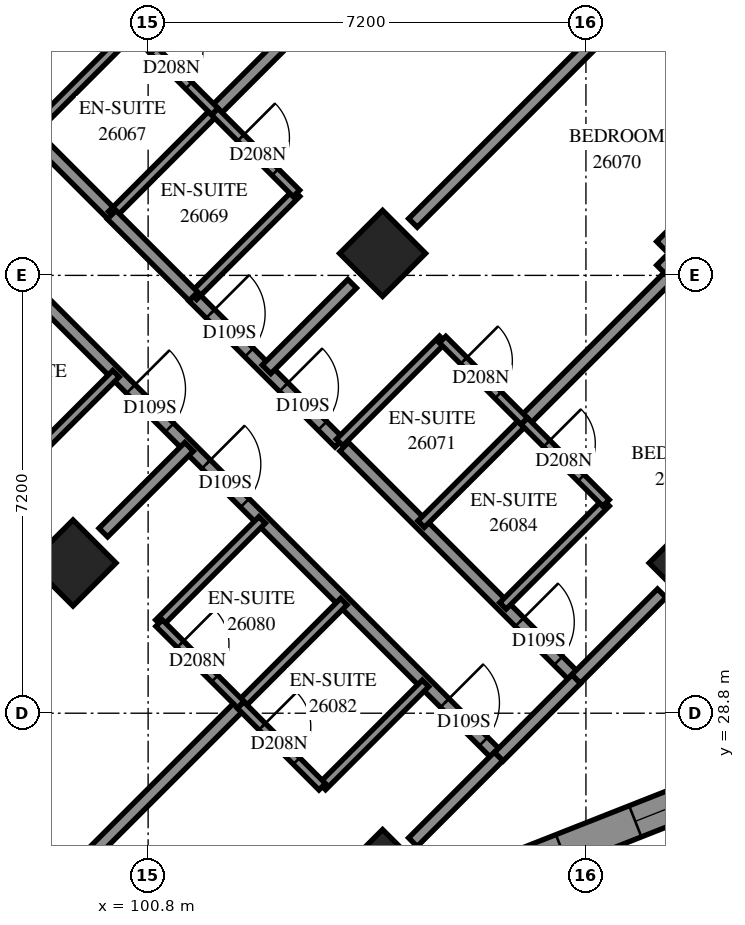
"""IFC4 building model, lengths in metres.
Left out: names, types, materials, properties, quantities, classifications, styles, units other than length and angle.
Written with IfcOpenShell. Run it as: python <this file> out.ifc"""

import sys

from ifc_helpers import new_model, si_unit, direction, frame, frame_2d, origin, origin_2d, place, context, subcontext, project, spatial, polyline, rectangle, outline, extrude, element, fill, save


model = new_model("IFC4")
c1 = context("Model", 3, precision=1e-05, world=origin(), true_north=direction((0.0, 1.0)))
c2 = subcontext(c1, "Body", "Model", "MODEL_VIEW")
j1 = project(units=[si_unit("LENGTHUNIT", "METRE"), si_unit("PLANEANGLEUNIT", "RADIAN")], contexts=[c1])
p1 = place(None, origin())
s1 = spatial("IfcSite", under=j1, at=p1, CompositionType="ELEMENT")
p2 = place(p1, origin())
s2 = spatial("IfcBuilding", under=s1, at=p2, CompositionType="ELEMENT")
p3 = place(p2, frame((0.0, 0.0, 98.2)))
s3 = spatial("IfcBuildingStorey", under=s2, at=p3, CompositionType="ELEMENT", Elevation=98.2)
for number, where, z_axis, x_axis in (
    (1, (104.656, 36.362, 0.0), (0.0, 0.0, 1.0), (0.707, -0.707, 0.0)),
    (2, (99.565, 31.271, 0.0), (0.0, 0.0, 1.0), (0.707, -0.707, 0.0)),
    (3, (109.747, 31.271, 0.0), (0.0, 0.0, 1.0), (0.707, -0.707, 0.0)),
    (4, (104.656, 26.18, 0.0), (0.0, 0.0, 1.0), (0.707, -0.707, 0.0)),
):
    element("IfcColumn", number, at=place(p3, frame(where, z_axis=z_axis, x_axis=x_axis)), inside=s3, PredefinedType="COLUMN", context=c2, shape_type="SweptSolid", body=[
        extrude(rectangle(XDim=1.0, YDim=1.0, at=origin_2d()), origin(), (0.0, 0.0, 1.0), 3.1),
    ])
p4 = place(p3, frame((105.911, 25.878, 0.0), z_axis=(0.0, 0.0, 1.0), x_axis=(0.930334543, 0.3667119279, 0.0)))
e5 = element("IfcWall", 5, at=p4, inside=s3, PredefinedType="SOLIDWALL", context=c2, shape_type="SweptSolid", body=[
    extrude(outline(polyline([(0.119, -0.275), (5.64, -0.275), (5.39, 0.275), (-0.119, 0.275), (0.119, -0.275)])), origin(), (0.0, 0.0, 1.0), 3.1),
])
p5 = place(p4, frame((0.623, 0.0, 0.5)))
e6 = element("IfcOpeningElement", 6, at=p5, cuts=e5, PredefinedType="OPENING", context=c2, shape_type="SweptSolid", body=[
    extrude(rectangle(XDim=1.2, YDim=2.45, at=frame_2d((0.6, 1.225))), frame((0.0, 0.285, 0.0), z_axis=(0.0, -1.0, 0.0), x_axis=(1.0, 0.0, 0.0)), (0.0, 0.0, 1.0), 0.57),
])
p6 = place(p4, frame((3.118, 0.0, 0.5)))
e7 = element("IfcOpeningElement", 7, at=p6, cuts=e5, PredefinedType="OPENING", context=c2, shape_type="SweptSolid", body=[
    extrude(rectangle(XDim=1.2, YDim=2.45, at=frame_2d((0.6, 1.225))), frame((0.0, 0.285, 0.0), z_axis=(0.0, -1.0, 0.0), x_axis=(1.0, 0.0, 0.0)), (0.0, 0.0, 1.0), 0.57),
])
p7 = place(p3, frame((112.824, 32.896, 0.0), z_axis=(0.0, 0.0, 1.0), x_axis=(-0.7071067812, 0.7071067812, 0.0)))
e8 = element("IfcWall", 8, at=p7, inside=s3, PredefinedType="SOLIDWALL", context=c2, shape_type="SweptSolid", body=[
    extrude(outline(polyline([(-0.174, -0.275), (4.626, -0.275), (5.176, 0.275), (0.174, 0.275), (-0.174, -0.275)])), origin(), (0.0, 0.0, 1.0), 3.1),
])
p8 = place(p7, frame((1.964, 0.0, 0.6)))
e9 = element("IfcOpeningElement", 9, at=p8, cuts=e8, PredefinedType="OPENING", context=c2, shape_type="SweptSolid", body=[
    extrude(rectangle(XDim=1.8, YDim=1.9, at=frame_2d((0.9, 0.95))), frame((0.0, 0.285, 0.0), z_axis=(0.0, -1.0, 0.0), x_axis=(1.0, 0.0, 0.0)), (0.0, 0.0, 1.0), 0.57),
])
p9 = place(p3, frame((109.358, 36.362, 0.0), z_axis=(0.0, 0.0, 1.0), x_axis=(0.7071067812, 0.7071067812, 0.0)))
e10 = element("IfcWall", 10, at=p9, inside=s3, PredefinedType="SOLIDWALL", context=c2, shape_type="SweptSolid", body=[
    extrude(outline(polyline([(0.275, -0.275), (6.126, -0.275), (5.381, 0.275), (-0.275, 0.275), (0.275, -0.275)])), origin(), (0.0, 0.0, 1.0), 3.1),
])
p10 = place(p9, frame((1.137, 0.0, 0.6)))
e11 = element("IfcOpeningElement", 11, at=p10, cuts=e10, PredefinedType="OPENING", context=c2, shape_type="SweptSolid", body=[
    extrude(rectangle(XDim=1.8, YDim=1.9, at=frame_2d((0.9, 0.95))), frame((0.0, 0.285, 0.0), z_axis=(0.0, -1.0, 0.0), x_axis=(1.0, 0.0, 0.0)), (0.0, 0.0, 1.0), 0.57),
])
p11 = place(p3, frame((93.339, 41.309, 0.0), z_axis=(0.0, 0.0, 1.0), x_axis=(0.7071067812, -0.7071067812, 0.0)))
e12 = element("IfcWall", 12, at=p11, inside=s3, PredefinedType="PARTITIONING", context=c2, shape_type="SweptSolid", body=[
    extrude(rectangle(XDim=18.702, YDim=0.2, at=frame_2d((9.351, 0.0))), origin(), (0.0, 0.0, 1.0), 3.1),
])
p12 = place(p11, frame((3.05, 0.0, 0.0)))
e13 = element("IfcOpeningElement", 13, at=p12, cuts=e12, PredefinedType="OPENING", context=c2, shape_type="SweptSolid", body=[
    extrude(rectangle(XDim=0.9, YDim=2.1, at=frame_2d((0.45, 1.05))), frame((0.0, 0.11, 0.0), z_axis=(0.0, -1.0, 0.0), x_axis=(1.0, 0.0, 0.0)), (0.0, 0.0, 1.0), 0.22),
])
p13 = place(p11, frame((4.7, 0.0, 0.0)))
e14 = element("IfcOpeningElement", 14, at=p13, cuts=e12, PredefinedType="OPENING", context=c2, shape_type="SweptSolid", body=[
    extrude(rectangle(XDim=0.9, YDim=2.1, at=frame_2d((0.45, 1.05))), frame((0.0, 0.11, 0.0), z_axis=(0.0, -1.0, 0.0), x_axis=(1.0, 0.0, 0.0)), (0.0, 0.0, 1.0), 0.22),
])
p14 = place(p11, frame((10.149, 0.0, 0.0)))
e15 = element("IfcOpeningElement", 15, at=p14, cuts=e12, PredefinedType="OPENING", context=c2, shape_type="SweptSolid", body=[
    extrude(rectangle(XDim=0.9, YDim=2.1, at=frame_2d((0.45, 1.05))), frame((0.0, 0.11, 0.0), z_axis=(0.0, -1.0, 0.0), x_axis=(1.0, 0.0, 0.0)), (0.0, 0.0, 1.0), 0.22),
])
p15 = place(p11, frame((11.9, 0.0, 0.0)))
e16 = element("IfcOpeningElement", 16, at=p15, cuts=e12, PredefinedType="OPENING", context=c2, shape_type="SweptSolid", body=[
    extrude(rectangle(XDim=0.9, YDim=2.1, at=frame_2d((0.45, 1.05))), frame((0.0, 0.11, 0.0), z_axis=(0.0, -1.0, 0.0), x_axis=(1.0, 0.0, 0.0)), (0.0, 0.0, 1.0), 0.22),
])
p16 = place(p11, frame((17.45, 0.0, 0.0)))
e17 = element("IfcOpeningElement", 17, at=p16, cuts=e12, PredefinedType="OPENING", context=c2, shape_type="SweptSolid", body=[
    extrude(rectangle(XDim=0.9, YDim=2.1, at=frame_2d((0.45, 1.05))), frame((0.0, 0.11, 0.0), z_axis=(0.0, -1.0, 0.0), x_axis=(1.0, 0.0, 0.0)), (0.0, 0.0, 1.0), 0.22),
])
p17 = place(p3, frame((101.896, 38.698, 0.0), z_axis=(0.0, 0.0, 1.0), x_axis=(0.7072296489, 0.7069838921, 0.0)))
e18 = element("IfcWall", 18, at=p17, inside=s3, PredefinedType="PARTITIONING", context=c2, shape_type="SweptSolid", body=[
    extrude(rectangle(XDim=8.545, YDim=0.2, at=frame_2d((4.272, 0.0))), origin(), (0.0, 0.0, 1.0), 3.1),
])
p18 = place(p3, frame((96.492, 23.108, 0.0), z_axis=(0.0, 0.0, 1.0), x_axis=(0.7071128444, 0.7071007179, 0.0)))
e19 = element("IfcWall", 19, at=p18, inside=s3, PredefinedType="PARTITIONING", context=c2, shape_type="SweptSolid", body=[
    extrude(rectangle(XDim=8.246, YDim=0.2, at=frame_2d((4.123, 0.0))), origin(), (0.0, 0.0, 1.0), 3.1),
])
p19 = place(p3, frame((94.62, 42.587, 0.0), z_axis=(0.0, 0.0, 1.0), x_axis=(0.7071067812, -0.7071067812, 0.0)))
e20 = element("IfcWall", 20, at=p19, inside=s3, PredefinedType="PARTITIONING", context=c2, shape_type="SweptSolid", body=[
    extrude(rectangle(XDim=7.9, YDim=0.2, at=frame_2d((3.95, 0.0))), origin(), (0.0, 0.0, 1.0), 3.1),
])
p20 = place(p19, frame((2.998, 0.0, 0.0)))
e21 = element("IfcOpeningElement", 21, at=p20, cuts=e20, PredefinedType="OPENING", context=c2, shape_type="SweptSolid", body=[
    extrude(rectangle(XDim=0.9, YDim=2.1, at=frame_2d((0.45, 1.05))), frame((0.0, 0.11, 0.0), z_axis=(0.0, -1.0, 0.0), x_axis=(1.0, 0.0, 0.0)), (0.0, 0.0, 1.0), 0.22),
])
p21 = place(p19, frame((4.649, 0.0, 0.0)))
e22 = element("IfcOpeningElement", 22, at=p21, cuts=e20, PredefinedType="OPENING", context=c2, shape_type="SweptSolid", body=[
    extrude(rectangle(XDim=0.9, YDim=2.1, at=frame_2d((0.45, 1.05))), frame((0.0, 0.11, 0.0), z_axis=(0.0, -1.0, 0.0), x_axis=(1.0, 0.0, 0.0)), (0.0, 0.0, 1.0), 0.22),
])
p22 = place(p3, frame((105.155, 36.863, 0.0), z_axis=(0.0, 0.0, 1.0), x_axis=(0.7071067812, 0.7071067812, 0.0)))
e23 = element("IfcWall", 23, at=p22, inside=s3, PredefinedType="PARTITIONING", context=c2, shape_type="SweptSolid", body=[
    extrude(rectangle(XDim=5.787, YDim=0.2, at=frame_2d((2.893, 0.0))), origin(), (0.0, 0.0, 1.0), 3.1),
])
p23 = place(p3, frame((104.023, 33.184, 0.0), z_axis=(0.0, 0.0, 1.0), x_axis=(0.7071067812, -0.7071067812, 0.0)))
e24 = element("IfcWall", 24, at=p23, inside=s3, PredefinedType="PARTITIONING", context=c2, shape_type="SweptSolid", body=[
    extrude(rectangle(XDim=5.399, YDim=0.2, at=frame_2d((2.7, 0.0))), origin(), (0.0, 0.0, 1.0), 3.1),
])
p24 = place(p23, frame((4.08, 0.0, 0.0)))
e25 = element("IfcOpeningElement", 25, at=p24, cuts=e24, PredefinedType="OPENING", context=c2, shape_type="SweptSolid", body=[
    extrude(rectangle(XDim=0.9, YDim=2.1, at=frame_2d((0.45, 1.05))), frame((0.0, 0.11, 0.0), z_axis=(0.0, -1.0, 0.0), x_axis=(1.0, 0.0, 0.0)), (0.0, 0.0, 1.0), 0.22),
])
p25 = place(p3, frame((101.541, 35.651, 0.0), z_axis=(0.0, 0.0, 1.0), x_axis=(0.7071067812, -0.7071067812, 0.0)))
e26 = element("IfcWall", 26, at=p25, inside=s3, PredefinedType="PARTITIONING", context=c2, shape_type="SweptSolid", body=[
    extrude(rectangle(XDim=3.4, YDim=0.2, at=frame_2d((1.7, 0.0))), origin(), (0.0, 0.0, 1.0), 3.1),
])
p26 = place(p25, frame((0.4, 0.0, 0.0)))
e27 = element("IfcOpeningElement", 27, at=p26, cuts=e26, PredefinedType="OPENING", context=c2, shape_type="SweptSolid", body=[
    extrude(rectangle(XDim=0.9, YDim=2.1, at=frame_2d((0.45, 1.05))), frame((0.0, 0.11, 0.0), z_axis=(0.0, -1.0, 0.0), x_axis=(1.0, 0.0, 0.0)), (0.0, 0.0, 1.0), 0.22),
])
p27 = place(p25, frame((2.105, 0.0, 0.0)))
e28 = element("IfcOpeningElement", 28, at=p27, cuts=e26, PredefinedType="OPENING", context=c2, shape_type="SweptSolid", body=[
    extrude(rectangle(XDim=0.9, YDim=2.1, at=frame_2d((0.45, 1.05))), frame((0.0, 0.11, 0.0), z_axis=(0.0, -1.0, 0.0), x_axis=(1.0, 0.0, 0.0)), (0.0, 0.0, 1.0), 0.22),
])
p28 = place(p3, frame((106.989, 33.605, 0.0), z_axis=(0.0, 0.0, 1.0), x_axis=(0.7071067812, 0.7071067812, 0.0)))
e29 = element("IfcWall", 29, at=p28, inside=s3, PredefinedType="PARTITIONING", context=c2, shape_type="SweptSolid", body=[
    extrude(rectangle(XDim=3.35, YDim=0.2, at=frame_2d((1.675, 0.0))), origin(), (0.0, 0.0, 1.0), 3.1),
])
for number, where, z_axis, x_axis in (
    (30, (100.977, 30.281, 0.0), (0.0, 0.0, 1.0), (0.707, 0.707, 0.0)),
    (31, (98.573, 32.685, 0.0), (0.0, 0.0, 1.0), (0.707, 0.707, 0.0)),
):
    element("IfcWall", number, at=place(p3, frame(where, z_axis=z_axis, x_axis=x_axis)), inside=s3, PredefinedType="PARTITIONING", context=c2, shape_type="SweptSolid", body=[
        extrude(rectangle(XDim=2.401, YDim=0.15, at=frame_2d((1.201, 0.0))), origin(), (0.0, 0.0, 1.0), 3.1),
    ])
for number, where, z_axis, x_axis in (
    (32, (100.203, 36.997, 0.0), (0.0, 0.0, 1.0), (0.707, 0.708, 0.0)),
    (33, (105.29, 31.91, 0.0), (0.0, 0.0, 1.0), (0.708, 0.707, 0.0)),
):
    element("IfcWall", number, at=place(p3, frame(where, z_axis=z_axis, x_axis=x_axis)), inside=s3, PredefinedType="PARTITIONING", context=c2, shape_type="SweptSolid", body=[
        extrude(rectangle(XDim=2.4, YDim=0.15, at=frame_2d((1.2, 0.0))), origin(), (0.0, 0.0, 1.0), 3.1),
    ])
for number, where, z_axis, x_axis in (
    (34, (98.857, 38.343, 0.0), (0.0, 0.0, 1.0), (0.707, 0.707, 0.0)),
    (35, (101.545, 35.657, 0.0), (0.0, 0.0, 1.0), (0.707, 0.707, 0.0)),
    (36, (102.323, 28.939, 0.0), (0.0, 0.0, 1.0), (0.707, 0.707, 0.0)),
    (37, (103.665, 27.595, 0.0), (0.0, 0.0, 1.0), (0.707, 0.707, 0.0)),
    (38, (106.635, 30.565, 0.0), (0.0, 0.0, 1.0), (0.707, 0.707, 0.0)),
    (39, (103.949, 33.253, 0.0), (0.0, 0.0, 1.0), (0.707, 0.707, 0.0)),
):
    element("IfcWall", number, at=place(p3, frame(where, z_axis=z_axis, x_axis=x_axis)), inside=s3, PredefinedType="PARTITIONING", context=c2, shape_type="SweptSolid", body=[
        extrude(rectangle(XDim=2.398, YDim=0.15, at=frame_2d((1.199, 0.0))), origin(), (0.0, 0.0, 1.0), 3.1),
    ])
p29 = place(p3, frame((100.063, 31.771, 0.0), z_axis=(0.0, 0.0, 1.0), x_axis=(0.7071067812, 0.7071067812, 0.0)))
e40 = element("IfcWall", 40, at=p29, inside=s3, PredefinedType="PARTITIONING", context=c2, shape_type="SweptSolid", body=[
    extrude(rectangle(XDim=1.994, YDim=0.2, at=frame_2d((0.997, 0.0))), origin(), (0.0, 0.0, 1.0), 3.1),
])
for number, where, z_axis, x_axis in (
    (41, (107.837, 29.363, 0.0), (0.0, 0.0, 1.0), (0.707, 0.707, 0.0)),
    (42, (105.154, 26.68, 0.0), (0.0, 0.0, 1.0), (0.707, 0.707, 0.0)),
):
    element("IfcWall", number, at=place(p3, frame(where, z_axis=z_axis, x_axis=x_axis)), inside=s3, PredefinedType="PARTITIONING", context=c2, shape_type="SweptSolid", body=[
        extrude(rectangle(XDim=1.994, YDim=0.2, at=frame_2d((0.997, 0.0))), origin(), (0.0, 0.0, 1.0), 2.6),
    ])
p30 = place(p3, frame((102.747, 34.455, 0.0), z_axis=(0.0, 0.0, 1.0), x_axis=(0.7071067812, 0.7071067812, 0.0)))
e43 = element("IfcWall", 43, at=p30, inside=s3, PredefinedType="PARTITIONING", context=c2, shape_type="SweptSolid", body=[
    extrude(rectangle(XDim=1.991, YDim=0.2, at=frame_2d((0.996, 0.0))), origin(), (0.0, 0.0, 1.0), 3.1),
])
p31 = place(p3, frame((101.894, 38.693, 0.0), z_axis=(0.0, 0.0, 1.0), x_axis=(0.7071067812, -0.7071067812, 0.0)))
e44 = element("IfcWall", 44, at=p31, inside=s3, PredefinedType="PARTITIONING", context=c2, shape_type="SweptSolid", body=[
    extrude(rectangle(XDim=1.901, YDim=0.15, at=frame_2d((0.95, 0.0))), origin(), (0.0, 0.0, 1.0), 3.1),
])
p32 = place(p31, frame((0.608, 0.0, 0.0)))
e45 = element("IfcOpeningElement", 45, at=p32, cuts=e44, PredefinedType="OPENING", context=c2, shape_type="SweptSolid", body=[
    extrude(rectangle(XDim=0.8, YDim=2.1, at=frame_2d((0.4, 1.05))), frame((0.0, 0.085, 0.0), z_axis=(0.0, -1.0, 0.0), x_axis=(1.0, 0.0, 0.0)), (0.0, 0.0, 1.0), 0.17),
])
p33 = place(p3, frame((105.642, 34.944, 0.0), z_axis=(0.0, 0.0, 1.0), x_axis=(0.7071067812, -0.7071067812, 0.0)))
e46 = element("IfcWall", 46, at=p33, inside=s3, PredefinedType="PARTITIONING", context=c2, shape_type="SweptSolid", body=[
    extrude(rectangle(XDim=1.901, YDim=0.15, at=frame_2d((0.95, 0.0))), origin(), (0.0, 0.0, 1.0), 3.1),
])
p34 = place(p33, frame((0.491, 0.0, 0.0)))
e47 = element("IfcOpeningElement", 47, at=p34, cuts=e46, PredefinedType="OPENING", context=c2, shape_type="SweptSolid", body=[
    extrude(rectangle(XDim=0.8, YDim=2.1, at=frame_2d((0.4, 1.05))), frame((0.0, 0.085, 0.0), z_axis=(0.0, -1.0, 0.0), x_axis=(1.0, 0.0, 0.0)), (0.0, 0.0, 1.0), 0.17),
])
p35 = place(p3, frame((100.981, 30.283, 0.0), z_axis=(0.0, 0.0, 1.0), x_axis=(0.7076330979, -0.7065800724, 0.0)))
e48 = element("IfcWall", 48, at=p35, inside=s3, PredefinedType="PARTITIONING", context=c2, shape_type="SweptSolid", body=[
    extrude(rectangle(XDim=1.899, YDim=0.15, at=frame_2d((0.95, 0.0))), origin(), (0.0, 0.0, 1.0), 3.1),
])
p36 = place(p35, frame((0.493, 0.0, 0.0)))
e49 = element("IfcOpeningElement", 49, at=p36, cuts=e48, PredefinedType="OPENING", context=c2, shape_type="SweptSolid", body=[
    extrude(rectangle(XDim=0.8, YDim=2.1, at=frame_2d((0.4, 1.05))), frame((0.0, 0.085, 0.0), z_axis=(0.0, -1.0, 0.0), x_axis=(1.0, 0.0, 0.0)), (0.0, 0.0, 1.0), 0.17),
])
p37 = place(p3, frame((100.553, 40.037, 0.0), z_axis=(0.0, 0.0, 1.0), x_axis=(0.7076330979, -0.7065800724, 0.0)))
e50 = element("IfcWall", 50, at=p37, inside=s3, PredefinedType="PARTITIONING", context=c2, shape_type="SweptSolid", body=[
    extrude(rectangle(XDim=1.899, YDim=0.15, at=frame_2d((0.95, 0.0))), origin(), (0.0, 0.0, 1.0), 3.1),
])
p38 = place(p37, frame((0.493, 0.0, 0.0)))
e51 = element("IfcOpeningElement", 51, at=p38, cuts=e50, PredefinedType="OPENING", context=c2, shape_type="SweptSolid", body=[
    extrude(rectangle(XDim=0.8, YDim=2.1, at=frame_2d((0.4, 1.05))), frame((0.0, 0.085, 0.0), z_axis=(0.0, -1.0, 0.0), x_axis=(1.0, 0.0, 0.0)), (0.0, 0.0, 1.0), 0.17),
])
p39 = place(p3, frame((100.201, 36.997, 0.0), z_axis=(0.0, 0.0, 1.0), x_axis=(0.7076330979, -0.7065800724, 0.0)))
e52 = element("IfcWall", 52, at=p39, inside=s3, PredefinedType="PARTITIONING", context=c2, shape_type="SweptSolid", body=[
    extrude(rectangle(XDim=1.899, YDim=0.2, at=frame_2d((0.95, 0.0))), origin(), (0.0, 0.0, 1.0), 3.1),
])
p40 = place(p3, frame((102.321, 28.935, 0.0), z_axis=(0.0, 0.0, 1.0), x_axis=(0.7065800724, -0.7076330979, 0.0)))
e53 = element("IfcWall", 53, at=p40, inside=s3, PredefinedType="PARTITIONING", context=c2, shape_type="SweptSolid", body=[
    extrude(rectangle(XDim=1.899, YDim=0.15, at=frame_2d((0.95, 0.0))), origin(), (0.0, 0.0, 1.0), 3.1),
])
p41 = place(p40, frame((0.501, 0.0, 0.0)))
e54 = element("IfcOpeningElement", 54, at=p41, cuts=e53, PredefinedType="OPENING", context=c2, shape_type="SweptSolid", body=[
    extrude(rectangle(XDim=0.8, YDim=2.1, at=frame_2d((0.4, 1.05))), frame((0.0, 0.085, 0.0), z_axis=(0.0, -1.0, 0.0), x_axis=(1.0, 0.0, 0.0)), (0.0, 0.0, 1.0), 0.17),
])
p42 = place(p3, frame((106.987, 33.602, 0.0), z_axis=(0.0, 0.0, 1.0), x_axis=(0.7065800724, -0.7076330979, 0.0)))
e55 = element("IfcWall", 55, at=p42, inside=s3, PredefinedType="PARTITIONING", context=c2, shape_type="SweptSolid", body=[
    extrude(rectangle(XDim=1.899, YDim=0.15, at=frame_2d((0.95, 0.0))), origin(), (0.0, 0.0, 1.0), 3.1),
])
p43 = place(p42, frame((0.519, 0.0, 0.0)))
e56 = element("IfcOpeningElement", 56, at=p43, cuts=e55, PredefinedType="OPENING", context=c2, shape_type="SweptSolid", body=[
    extrude(rectangle(XDim=0.8, YDim=2.1, at=frame_2d((0.4, 1.05))), frame((0.0, 0.085, 0.0), z_axis=(0.0, -1.0, 0.0), x_axis=(1.0, 0.0, 0.0)), (0.0, 0.0, 1.0), 0.17),
])
p44 = place(p3, frame((106.568, 28.086, 0.0), z_axis=(0.0, 0.0, 1.0), x_axis=(0.7065510983, 0.7076620277, 0.0)))
e57 = element("IfcWall", 57, at=p44, inside=s3, PredefinedType="PARTITIONING", context=c2, shape_type="SweptSolid", body=[
    extrude(rectangle(XDim=1.8, YDim=0.2, at=frame_2d((0.9, 0.0))), origin(), (0.0, 0.0, 1.0), 2.6),
])
p45 = place(p5, origin())
e58 = element("IfcWindow", 58, at=p45, inside=s3, PartitioningType="SINGLE_PANEL", PredefinedType="WINDOW", context=c2, shape_type="SweptSolid", body=[
    extrude(rectangle(XDim=1.2, YDim=2.45, at=frame_2d((0.6, 1.225))), frame((0.0, 0.155, 0.0), z_axis=(0.0, -1.0, 0.0), x_axis=(1.0, 0.0, 0.0)), (0.0, 0.0, 1.0), 0.06),
])
fill(e6, e58)
p46 = place(p6, origin())
e59 = element("IfcWindow", 59, at=p46, inside=s3, PartitioningType="SINGLE_PANEL", PredefinedType="WINDOW", context=c2, shape_type="SweptSolid", body=[
    extrude(rectangle(XDim=1.2, YDim=2.45, at=frame_2d((0.6, 1.225))), frame((0.0, 0.155, 0.0), z_axis=(0.0, -1.0, 0.0), x_axis=(1.0, 0.0, 0.0)), (0.0, 0.0, 1.0), 0.06),
])
fill(e7, e59)
p47 = place(p38, origin())
e60 = element("IfcDoor", 60, at=p47, inside=s3, OperationType="SINGLE_SWING_RIGHT", PredefinedType="DOOR", context=c2, shape_type="SweptSolid", body=[
    extrude(rectangle(XDim=0.8, YDim=2.1, at=frame_2d((0.4, 1.05))), frame((0.0, 0.025, 0.0), z_axis=(0.0, -1.0, 0.0), x_axis=(1.0, 0.0, 0.0)), (0.0, 0.0, 1.0), 0.05),
])
fill(e51, e60)
p48 = place(p26, origin())
e61 = element("IfcDoor", 61, at=p48, inside=s3, OperationType="SINGLE_SWING_RIGHT", PredefinedType="DOOR", context=c2, shape_type="SweptSolid", body=[
    extrude(rectangle(XDim=0.9, YDim=2.1, at=frame_2d((0.45, 1.05))), frame((0.0, 0.025, 0.0), z_axis=(0.0, -1.0, 0.0), x_axis=(1.0, 0.0, 0.0)), (0.0, 0.0, 1.0), 0.05),
])
fill(e27, e61)
p49 = place(p32, origin())
e62 = element("IfcDoor", 62, at=p49, inside=s3, OperationType="SINGLE_SWING_RIGHT", PredefinedType="DOOR", context=c2, shape_type="SweptSolid", body=[
    extrude(rectangle(XDim=0.8, YDim=2.1, at=frame_2d((0.4, 1.05))), frame((0.0, 0.025, 0.0), z_axis=(0.0, -1.0, 0.0), x_axis=(1.0, 0.0, 0.0)), (0.0, 0.0, 1.0), 0.05),
])
fill(e45, e62)
p50 = place(p27, origin())
e63 = element("IfcDoor", 63, at=p50, inside=s3, OperationType="SINGLE_SWING_LEFT", PredefinedType="DOOR", context=c2, shape_type="SweptSolid", body=[
    extrude(rectangle(XDim=0.9, YDim=2.1, at=frame_2d((0.45, 1.05))), frame((0.0, 0.025, 0.0), z_axis=(0.0, -1.0, 0.0), x_axis=(1.0, 0.0, 0.0)), (0.0, 0.0, 1.0), 0.05),
])
fill(e28, e63)
p51 = place(p34, origin())
e64 = element("IfcDoor", 64, at=p51, inside=s3, OperationType="SINGLE_SWING_RIGHT", PredefinedType="DOOR", context=c2, shape_type="SweptSolid", body=[
    extrude(rectangle(XDim=0.8, YDim=2.1, at=frame_2d((0.4, 1.05))), frame((0.0, 0.025, 0.0), z_axis=(0.0, -1.0, 0.0), x_axis=(1.0, 0.0, 0.0)), (0.0, 0.0, 1.0), 0.05),
])
fill(e47, e64)
p52 = place(p14, origin())
e65 = element("IfcDoor", 65, at=p52, inside=s3, OperationType="SINGLE_SWING_LEFT", PredefinedType="DOOR", context=c2, shape_type="SweptSolid", body=[
    extrude(rectangle(XDim=0.9, YDim=2.1, at=frame_2d((0.45, 1.05))), frame((0.0, 0.025, 0.0), z_axis=(0.0, -1.0, 0.0), x_axis=(1.0, 0.0, 0.0)), (0.0, 0.0, 1.0), 0.05),
])
fill(e15, e65)
p53 = place(p15, origin())
e66 = element("IfcDoor", 66, at=p53, inside=s3, OperationType="SINGLE_SWING_RIGHT", PredefinedType="DOOR", context=c2, shape_type="SweptSolid", body=[
    extrude(rectangle(XDim=0.9, YDim=2.1, at=frame_2d((0.45, 1.05))), frame((0.0, 0.025, 0.0), z_axis=(0.0, -1.0, 0.0), x_axis=(1.0, 0.0, 0.0)), (0.0, 0.0, 1.0), 0.05),
])
fill(e16, e66)
p54 = place(p36, origin())
e67 = element("IfcDoor", 67, at=p54, inside=s3, OperationType="SINGLE_SWING_RIGHT", PredefinedType="DOOR", context=c2, shape_type="SweptSolid", body=[
    extrude(rectangle(XDim=0.8, YDim=2.1, at=frame_2d((0.4, 1.05))), frame((0.0, 0.025, 0.0), z_axis=(0.0, -1.0, 0.0), x_axis=(1.0, 0.0, 0.0)), (0.0, 0.0, 1.0), 0.05),
])
fill(e49, e67)
p55 = place(p16, origin())
e68 = element("IfcDoor", 68, at=p55, inside=s3, OperationType="SINGLE_SWING_LEFT", PredefinedType="DOOR", context=c2, shape_type="SweptSolid", body=[
    extrude(rectangle(XDim=0.9, YDim=2.1, at=frame_2d((0.45, 1.05))), frame((0.0, 0.025, 0.0), z_axis=(0.0, -1.0, 0.0), x_axis=(1.0, 0.0, 0.0)), (0.0, 0.0, 1.0), 0.05),
])
fill(e17, e68)
p56 = place(p41, origin())
e69 = element("IfcDoor", 69, at=p56, inside=s3, OperationType="SINGLE_SWING_RIGHT", PredefinedType="DOOR", context=c2, shape_type="SweptSolid", body=[
    extrude(rectangle(XDim=0.8, YDim=2.1, at=frame_2d((0.4, 1.05))), frame((0.0, 0.025, 0.0), z_axis=(0.0, -1.0, 0.0), x_axis=(1.0, 0.0, 0.0)), (0.0, 0.0, 1.0), 0.05),
])
fill(e54, e69)
p57 = place(p24, origin())
e70 = element("IfcDoor", 70, at=p57, inside=s3, OperationType="SINGLE_SWING_RIGHT", PredefinedType="DOOR", context=c2, shape_type="SweptSolid", body=[
    extrude(rectangle(XDim=0.9, YDim=2.1, at=frame_2d((0.45, 1.05))), frame((0.0, 0.025, 0.0), z_axis=(0.0, -1.0, 0.0), x_axis=(1.0, 0.0, 0.0)), (0.0, 0.0, 1.0), 0.05),
])
fill(e25, e70)
p58 = place(p43, origin())
e71 = element("IfcDoor", 71, at=p58, inside=s3, OperationType="SINGLE_SWING_RIGHT", PredefinedType="DOOR", context=c2, shape_type="SweptSolid", body=[
    extrude(rectangle(XDim=0.8, YDim=2.1, at=frame_2d((0.4, 1.05))), frame((0.0, 0.025, 0.0), z_axis=(0.0, -1.0, 0.0), x_axis=(1.0, 0.0, 0.0)), (0.0, 0.0, 1.0), 0.05),
])
fill(e56, e71)
save(model, sys.argv[1])
